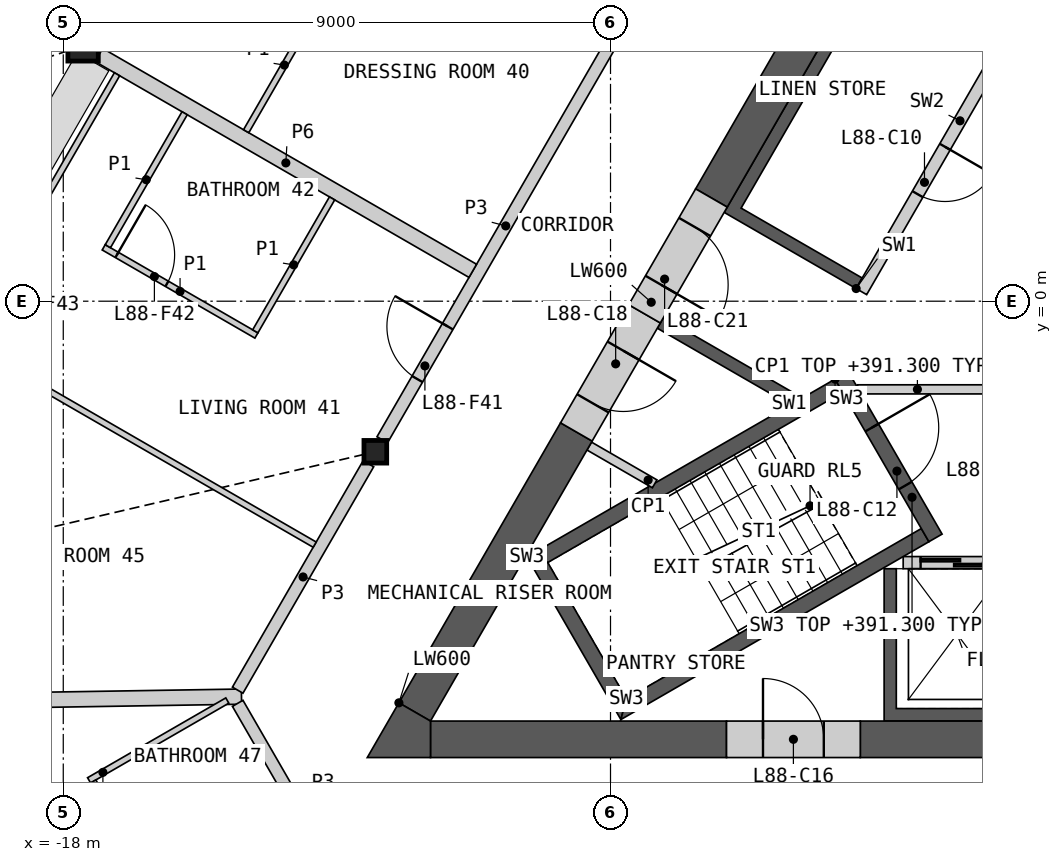
"""IFC4 building model, lengths in metres.
Left out: names, types, materials, properties, quantities, classifications, styles, units other than length and angle.
Written with IfcOpenShell. Run it as: python <this file> out.ifc"""

import sys

from ifc_helpers import new_model, si_unit, direction, frame, frame_2d, origin, origin_2d, place, context, subcontext, project, spatial, polyline, rectangle, hollow_rectangle, i_section, outline, extrude, element, fill, save


model = new_model("IFC4")
c1 = context("Model", 3, precision=1e-05, world=origin(), true_north=direction((0.0, 1.0)))
c2 = subcontext(c1, "Body", "Model", "MODEL_VIEW")
j1 = project(units=[si_unit("LENGTHUNIT", "METRE"), si_unit("PLANEANGLEUNIT", "RADIAN")], contexts=[c1])
p1 = place(None, origin())
s1 = spatial("IfcSite", under=j1, at=p1, CompositionType="ELEMENT")
p2 = place(p1, origin())
s2 = spatial("IfcBuilding", under=s1, at=p2, CompositionType="ELEMENT")
p3 = place(p2, frame((0.0, 0.0, 388.2)))
s3 = spatial("IfcBuildingStorey", under=s2, at=p3, CompositionType="ELEMENT", Elevation=388.2)
p4 = place(p3, frame((-17.674, 4.199, 0.0), z_axis=(0.0, 0.0, 1.0), x_axis=(1.0, 0.0, 0.0)))
e1 = element("IfcColumn", 1, at=p4, inside=s3, PredefinedType="COLUMN", context=c2, shape_type="SweptSolid", body=[
    extrude(hollow_rectangle(XDim=0.5, YDim=0.5, WallThickness=0.03, at=origin_2d()), origin(), (0.0, 0.0, 1.0), 3.4),
])
p5 = place(p3, frame((-12.868, -2.476, 0.0), z_axis=(0.0, 0.0, 1.0), x_axis=(1.0, 0.0, 0.0)))
e2 = element("IfcColumn", 2, at=p5, inside=s3, PredefinedType="COLUMN", context=c2, shape_type="SweptSolid", body=[
    extrude(i_section(OverallWidth=0.374, OverallDepth=0.372, WebThickness=0.016, FlangeThickness=0.026, at=origin_2d()), origin(), (0.0, 0.0, 1.0), 3.4),
])
p6 = place(p3, origin())
e3 = element("IfcWall", 3, at=p6, inside=s3, PredefinedType="SHEAR", context=c2, shape_type="SweptSolid", body=[
    extrude(outline(polyline([(4.5, -4.4), (4.5, -6.906), (-4.5, -6.906), (-4.5, -4.4), (-4.3, -4.4), (-4.3, -6.7), (-2.3, -6.7), (-2.3, -4.4), (-2.1, -4.4), (-2.1, -6.7), (-0.1, -6.7), (-0.1, -4.4), (0.1, -4.4), (0.1, -6.7), (2.1, -6.7), (2.1, -4.4), (2.3, -4.4), (2.3, -6.7), (4.3, -6.7), (4.3, -4.4), (4.5, -4.4)])), origin(), (0.0, 0.0, 1.0), 3.1),
])
p7 = place(p3, frame((-4.187, -4.3, 0.0), z_axis=(0.0, 0.0, 1.0), x_axis=(1.0, 0.0, 0.0)))
e4 = element("IfcWall", 4, at=p7, inside=s3, PredefinedType="SOLIDWALL", context=c2, shape_type="SweptSolid", body=[
    extrude(rectangle(XDim=8.373, YDim=0.2, at=frame_2d((4.187, 0.0))), origin(), (0.0, 0.0, 1.0), 3.1),
])
p8 = place(p7, frame((0.287, 0.0, 0.0)))
e5 = element("IfcOpeningElement", 5, at=p8, cuts=e4, PredefinedType="OPENING", context=c2, shape_type="SweptSolid", body=[
    extrude(rectangle(XDim=1.2, YDim=2.1, at=frame_2d((0.6, 1.05))), frame((0.0, 0.11, 0.0), z_axis=(0.0, -1.0, 0.0), x_axis=(1.0, 0.0, 0.0)), (0.0, 0.0, 1.0), 0.22),
])
p9 = place(p7, frame((2.387, 0.0, 0.0)))
e6 = element("IfcOpeningElement", 6, at=p9, cuts=e4, PredefinedType="OPENING", context=c2, shape_type="SweptSolid", body=[
    extrude(rectangle(XDim=1.4, YDim=2.1, at=frame_2d((0.7, 1.05))), frame((0.0, 0.11, 0.0), z_axis=(0.0, -1.0, 0.0), x_axis=(1.0, 0.0, 0.0)), (0.0, 0.0, 1.0), 0.22),
])
p10 = place(p7, frame((4.737, 0.0, 0.0)))
e7 = element("IfcOpeningElement", 7, at=p10, cuts=e4, PredefinedType="OPENING", context=c2, shape_type="SweptSolid", body=[
    extrude(rectangle(XDim=1.1, YDim=2.1, at=frame_2d((0.55, 1.05))), frame((0.0, 0.11, 0.0), z_axis=(0.0, -1.0, 0.0), x_axis=(1.0, 0.0, 0.0)), (0.0, 0.0, 1.0), 0.22),
])
p11 = place(p7, frame((6.887, 0.0, 0.0)))
e8 = element("IfcOpeningElement", 8, at=p11, cuts=e4, PredefinedType="OPENING", context=c2, shape_type="SweptSolid", body=[
    extrude(rectangle(XDim=1.2, YDim=2.1, at=frame_2d((0.6, 1.05))), frame((0.0, 0.11, 0.0), z_axis=(0.0, -1.0, 0.0), x_axis=(1.0, 0.0, 0.0)), (0.0, 0.0, 1.0), 0.22),
])
p12 = place(p3, origin())
e9 = element("IfcWall", 9, at=p12, inside=s3, PredefinedType="SHEAR", context=c2, shape_type="SweptSolid", body=[
    extrude(outline(polyline([(-6.061, -1.697), (-8.231, -0.444), (-8.131, -0.271), (-5.96, -1.524), (-6.061, -1.697)])), origin(), (0.0, 0.0, 1.0), 3.1),
])
p13 = place(p3, origin())
e10 = element("IfcWall", 10, at=p13, inside=s3, PredefinedType="SHEAR", context=c2, shape_type="SweptSolid", body=[
    extrude(outline(polyline([(-4.96, 0.208), (-7.131, 1.461), (-3.731, 7.35), (-1.561, 6.097), (-1.66, 5.924), (-3.652, 7.074), (-4.652, 5.342), (-2.66, 4.192), (-2.76, 4.019), (-4.752, 5.169), (-6.852, 1.531), (-4.861, 0.381), (-4.96, 0.208)])), origin(), (0.0, 0.0, 1.0), 3.1),
])
p14 = place(p3, frame((-1.631, 5.776, 0.0), z_axis=(0.0, 0.0, 1.0), x_axis=(-0.499992876559, -0.866029516466, 0.0)))
e11 = element("IfcWall", 11, at=p14, inside=s3, PredefinedType="SOLIDWALL", context=c2, shape_type="SweptSolid", body=[
    extrude(rectangle(XDim=6.486, YDim=0.2, at=frame_2d((3.243, 0.0))), origin(), (0.0, 0.0, 1.0), 3.1),
])
p15 = place(p14, frame((0.437, 0.0, 0.0)))
e12 = element("IfcOpeningElement", 12, at=p15, cuts=e11, PredefinedType="OPENING", context=c2, shape_type="SweptSolid", body=[
    extrude(rectangle(XDim=0.9, YDim=2.1, at=frame_2d((0.45, 1.05))), frame((0.0, 0.11, 0.0), z_axis=(0.0, -1.0, 0.0), x_axis=(1.0, 0.0, 0.0)), (0.0, 0.0, 1.0), 0.22),
])
p16 = place(p14, frame((3.737, 0.0, 0.0)))
e13 = element("IfcOpeningElement", 13, at=p16, cuts=e11, PredefinedType="OPENING", context=c2, shape_type="SweptSolid", body=[
    extrude(rectangle(XDim=0.9, YDim=2.1, at=frame_2d((0.45, 1.05))), frame((0.0, 0.11, 0.0), z_axis=(0.0, -1.0, 0.0), x_axis=(1.0, 0.0, 0.0)), (0.0, 0.0, 1.0), 0.22),
])
p17 = place(p3, frame((-4.941, -1.45, 0.0), z_axis=(0.0, 0.0, 1.0), x_axis=(1.0, 0.0, 0.0)))
e14 = element("IfcWall", 14, at=p17, inside=s3, PredefinedType="PARTITIONING", context=c2, shape_type="SweptSolid", body=[
    extrude(rectangle(XDim=9.882, YDim=0.15, at=frame_2d((4.941, 0.0))), origin(), (0.0, 0.0, 1.0), 3.1),
])
p18 = place(p17, frame((4.391, 0.0, 0.0)))
e15 = element("IfcOpeningElement", 15, at=p18, cuts=e14, PredefinedType="OPENING", context=c2, shape_type="SweptSolid", body=[
    extrude(rectangle(XDim=1.1, YDim=2.1, at=frame_2d((0.55, 1.05))), frame((0.0, 0.085, 0.0), z_axis=(0.0, -1.0, 0.0), x_axis=(1.0, 0.0, 0.0)), (0.0, 0.0, 1.0), 0.17),
])
p19 = place(p3, origin())
e16 = element("IfcWall", 16, at=p19, inside=s3, PredefinedType="SHEAR", context=c2, shape_type="SweptSolid", body=[
    extrude(outline(polyline([(-5.307, -1.281), (-10.374, -4.206), (-10.032, -4.298), (-5.182, -1.498), (-5.307, -1.281)])), origin(), (0.0, 0.0, 1.0), 3.1),
])
p20 = place(p3, origin())
e17 = element("IfcWall", 17, at=p20, inside=s3, PredefinedType="SHEAR", context=c2, shape_type="SweptSolid", body=[
    extrude(outline(polyline([(-10.374, -4.206), (-8.83, -6.881), (-8.738, -6.539), (-10.032, -4.298), (-10.374, -4.206)])), origin(), (0.0, 0.0, 1.0), 3.1),
])
p21 = place(p3, origin())
e18 = element("IfcWall", 18, at=p21, inside=s3, PredefinedType="SHEAR", context=c2, shape_type="SweptSolid", body=[
    extrude(outline(polyline([(-8.738, -6.539), (-8.83, -6.881), (-3.763, -3.956), (-3.888, -3.739), (-8.738, -6.539)])), origin(), (0.0, 0.0, 1.0), 3.1),
])
p22 = place(p3, frame((-5.199, -1.219, 0.0), z_axis=(0.0, 0.0, 1.0), x_axis=(0.499982516597, -0.866035497597, 0.0)))
e19 = element("IfcWall", 19, at=p22, inside=s3, PredefinedType="SHEAR", context=c2, shape_type="SweptSolid", body=[
    extrude(rectangle(XDim=3.088, YDim=0.25, at=frame_2d((1.544, 0.0))), origin(), (0.0, 0.0, 1.0), 3.1),
])
p23 = place(p22, frame((0.994, 0.0, 0.0)))
e20 = element("IfcOpeningElement", 20, at=p23, cuts=e19, PredefinedType="OPENING", context=c2, shape_type="SweptSolid", body=[
    extrude(rectangle(XDim=1.1, YDim=2.1, at=frame_2d((0.55, 1.05))), frame((0.0, 0.135, 0.0), z_axis=(0.0, -1.0, 0.0), x_axis=(1.0, 0.0, 0.0)), (0.0, 0.0, 1.0), 0.27),
])
p24 = place(p3, frame((-9.35, -2.383, 0.0), z_axis=(0.0, 0.0, 1.0), x_axis=(0.866057962423, -0.499943602543, 0.0)))
e21 = element("IfcWall", 21, at=p24, inside=s3, PredefinedType="PARTITIONING", context=c2, shape_type="SweptSolid", body=[
    extrude(rectangle(XDim=1.242, YDim=0.15, at=frame_2d((0.621, 0.0))), origin(), (0.0, 0.0, 1.0), 3.1),
])
p25 = place(p3, frame((-4.892, -7.206, 0.0), z_axis=(0.0, 0.0, 1.0), x_axis=(1.0, 0.0, 0.0)))
e22 = element("IfcWall", 22, at=p25, inside=s3, PredefinedType="SHEAR", context=c2, shape_type="SweptSolid", body=[
    extrude(rectangle(XDim=14.261, YDim=0.6, at=frame_2d((7.13, 0.0))), origin(), (0.0, 0.0, 1.0), 3.1),
])
p26 = place(p3, frame((-11.961, -7.206, 0.0), z_axis=(0.0, 0.0, 1.0), x_axis=(1.0, 0.0, 0.0)))
e23 = element("IfcWall", 23, at=p26, inside=s3, PredefinedType="SHEAR", context=c2, shape_type="SweptSolid", body=[
    extrude(rectangle(XDim=4.868, YDim=0.6, at=frame_2d((2.434, 0.0))), origin(), (0.0, 0.0, 1.0), 3.1),
])
p27 = place(p3, frame((-3.639, 8.107, 0.0), z_axis=(0.0, 0.0, 1.0), x_axis=(-0.49999180351, -0.866030135978, 0.0)))
e24 = element("IfcWall", 24, at=p27, inside=s3, PredefinedType="SHEAR", context=c2, shape_type="SweptSolid", body=[
    extrude(rectangle(XDim=7.401, YDim=0.6, at=frame_2d((3.701, 0.0))), origin(), (0.0, 0.0, 1.0), 3.1),
])
p28 = place(p3, frame((-9.562, -2.15, 0.0), z_axis=(0.0, 0.0, 1.0), x_axis=(-0.500015214976, -0.866016619236, 0.0)))
e25 = element("IfcWall", 25, at=p28, inside=s3, PredefinedType="SHEAR", context=c2, shape_type="SweptSolid", body=[
    extrude(rectangle(XDim=5.318, YDim=0.6, at=frame_2d((2.659, 0.0))), origin(), (0.0, 0.0, 1.0), 3.1),
])
p29 = place(p3, origin())
e26 = element("IfcWall", 26, at=p29, inside=s3, PredefinedType="SHEAR", context=c2, shape_type="SweptSolid", body=[
    extrude(outline(polyline([(-12.48, -6.606), (-11.961, -6.906), (-11.961, -7.506), (-13.0, -7.506), (-12.48, -6.606)])), origin(), (0.0, 0.0, 1.0), 3.1),
])
p30 = place(p3, frame((-7.092, -7.206, 0.0), z_axis=(0.0, 0.0, 1.0), x_axis=(1.0, 0.0, 0.0)))
e27 = element("IfcWall", 27, at=p30, inside=s3, PredefinedType="SHEAR", context=c2, shape_type="SweptSolid", body=[
    extrude(rectangle(XDim=2.2, YDim=0.6, at=frame_2d((1.1, 0.0))), origin(), (0.0, 0.0, 1.0), 3.1),
])
p31 = place(p30, frame((0.6, 0.0, 0.0)))
e28 = element("IfcOpeningElement", 28, at=p31, cuts=e27, PredefinedType="OPENING", context=c2, shape_type="SweptSolid", body=[
    extrude(rectangle(XDim=1.0, YDim=2.1, at=frame_2d((0.5, 1.05))), frame((0.0, 0.31, 0.0), z_axis=(0.0, -1.0, 0.0), x_axis=(1.0, 0.0, 0.0)), (0.0, 0.0, 1.0), 0.62),
])
p32 = place(p3, frame((-8.44, -0.208, 0.0), z_axis=(0.0, 0.0, 1.0), x_axis=(-0.500001951578, -0.866024277037, 0.0)))
e29 = element("IfcWall", 29, at=p32, inside=s3, PredefinedType="SHEAR", context=c2, shape_type="SweptSolid", body=[
    extrude(rectangle(XDim=2.243, YDim=0.6, at=frame_2d((1.122, 0.0))), origin(), (0.0, 0.0, 1.0), 3.1),
])
p33 = place(p32, frame((0.7, 0.0, 0.0)))
e30 = element("IfcOpeningElement", 30, at=p33, cuts=e29, PredefinedType="OPENING", context=c2, shape_type="SweptSolid", body=[
    extrude(rectangle(XDim=1.0, YDim=2.1, at=frame_2d((0.5, 1.05))), frame((0.0, 0.31, 0.0), z_axis=(0.0, -1.0, 0.0), x_axis=(1.0, 0.0, 0.0)), (0.0, 0.0, 1.0), 0.62),
])
p34 = place(p3, frame((-7.34, 1.698, 0.0), z_axis=(0.0, 0.0, 1.0), x_axis=(-0.50002983664, -0.866008176907, 0.0)))
e31 = element("IfcWall", 31, at=p34, inside=s3, PredefinedType="SHEAR", context=c2, shape_type="SweptSolid", body=[
    extrude(rectangle(XDim=2.2, YDim=0.6, at=frame_2d((1.1, 0.0))), origin(), (0.0, 0.0, 1.0), 3.1),
])
p35 = place(p34, frame((0.55, 0.0, 0.0)))
e32 = element("IfcOpeningElement", 32, at=p35, cuts=e31, PredefinedType="OPENING", context=c2, shape_type="SweptSolid", body=[
    extrude(rectangle(XDim=1.1, YDim=2.1, at=frame_2d((0.55, 1.05))), frame((0.0, 0.31, 0.0), z_axis=(0.0, -1.0, 0.0), x_axis=(1.0, 0.0, 0.0)), (0.0, 0.0, 1.0), 0.62),
])
p36 = place(p3, frame((-29.269, -6.732, 0.0), z_axis=(0.0, 0.0, 1.0), x_axis=(0.999870533117, 0.016090898164, 0.0)))
e33 = element("IfcWall", 33, at=p36, inside=s3, PredefinedType="PARTITIONING", context=c2, shape_type="SweptSolid", body=[
    extrude(rectangle(XDim=14.202, YDim=0.25, at=frame_2d((7.101, 0.0))), origin(), (0.0, 0.0, 1.0), 2.33),
])
p37 = place(p3, frame((-12.754, -2.279, 0.0), z_axis=(0.0, 0.0, 1.0), x_axis=(0.500001682468, 0.866024432409, 0.0)))
e34 = element("IfcWall", 34, at=p37, inside=s3, PredefinedType="PARTITIONING", context=c2, shape_type="SweptSolid", body=[
    extrude(rectangle(XDim=8.124, YDim=0.2, at=frame_2d((4.062, 0.0))), origin(), (0.0, 0.0, 1.0), 3.1),
])
p38 = place(p37, frame((1.153, 0.0, 0.0)))
e35 = element("IfcOpeningElement", 35, at=p38, cuts=e34, PredefinedType="OPENING", context=c2, shape_type="SweptSolid", body=[
    extrude(rectangle(XDim=1.0, YDim=2.1, at=frame_2d((0.5, 1.05))), frame((0.0, 0.11, 0.0), z_axis=(0.0, -1.0, 0.0), x_axis=(1.0, 0.0, 0.0)), (0.0, 0.0, 1.0), 0.22),
])
p39 = place(p3, frame((-17.414, 4.049, 0.0), z_axis=(0.0, 0.0, 1.0), x_axis=(0.866033839264, -0.499985389037, 0.0)))
e36 = element("IfcWall", 36, at=p39, inside=s3, PredefinedType="PARTITIONING", context=c2, shape_type="SweptSolid", body=[
    extrude(rectangle(XDim=7.1, YDim=0.25, at=frame_2d((3.55, 0.0))), origin(), (0.0, 0.0, 1.0), 2.33),
])
p40 = place(p3, frame((-15.131, -6.397, 0.0), z_axis=(0.0, 0.0, 1.0), x_axis=(0.499986217557, 0.866033360935, 0.0)))
e37 = element("IfcWall", 37, at=p40, inside=s3, PredefinedType="PARTITIONING", context=c2, shape_type="SweptSolid", body=[
    extrude(rectangle(XDim=4.3, YDim=0.2, at=frame_2d((2.15, 0.0))), origin(), (0.0, 0.0, 1.0), 3.1),
])
p41 = place(p3, frame((-15.131, -6.614, 0.0), z_axis=(0.0, 0.0, 1.0), x_axis=(0.499967746641, -0.866044024469, 0.0)))
e38 = element("IfcWall", 38, at=p41, inside=s3, PredefinedType="PARTITIONING", context=c2, shape_type="SweptSolid", body=[
    extrude(rectangle(XDim=3.676, YDim=0.2, at=frame_2d((1.838, 0.0))), origin(), (0.0, 0.0, 1.0), 3.1),
])
p42 = place(p41, frame((2.426, 0.0, 0.0)))
e39 = element("IfcOpeningElement", 39, at=p42, cuts=e38, PredefinedType="OPENING", context=c2, shape_type="SweptSolid", body=[
    extrude(rectangle(XDim=1.0, YDim=2.1, at=frame_2d((0.5, 1.05))), frame((0.0, 0.11, 0.0), z_axis=(0.0, -1.0, 0.0), x_axis=(1.0, 0.0, 0.0)), (0.0, 0.0, 1.0), 0.22),
])
p43 = place(p3, frame((-24.069, 1.887, 0.0), z_axis=(0.0, 0.0, 1.0), x_axis=(0.866023404247, -0.500003463284, 0.0)))
e40 = element("IfcWall", 40, at=p43, inside=s3, PredefinedType="PARTITIONING", context=c2, shape_type="SweptSolid", body=[
    extrude(rectangle(XDim=11.782, YDim=0.1, at=frame_2d((5.891, 0.0))), origin(), (0.0, 0.0, 1.0), 2.33),
])
p44 = place(p43, frame((3.159, 0.0, 0.0)))
e41 = element("IfcOpeningElement", 41, at=p44, cuts=e40, PredefinedType="OPENING", context=c2, shape_type="SweptSolid", body=[
    extrude(rectangle(XDim=0.95, YDim=2.1, at=frame_2d((0.475, 1.05))), frame((0.0, 0.06, 0.0), z_axis=(0.0, -1.0, 0.0), x_axis=(1.0, 0.0, 0.0)), (0.0, 0.0, 1.0), 0.12),
])
p45 = place(p3, frame((-19.628, -0.619, 0.0), z_axis=(0.0, 0.0, 1.0), x_axis=(0.499990214365, 0.86603105345, 0.0)))
e42 = element("IfcWall", 42, at=p45, inside=s3, PredefinedType="PARTITIONING", context=c2, shape_type="SweptSolid", body=[
    extrude(rectangle(XDim=5.025, YDim=0.1, at=frame_2d((2.512, 0.0))), origin(), (0.0, 0.0, 1.0), 2.33),
])
p46 = place(p45, frame((1.067, 0.0, 0.0)))
e43 = element("IfcOpeningElement", 43, at=p46, cuts=e42, PredefinedType="OPENING", context=c2, shape_type="SweptSolid", body=[
    extrude(rectangle(XDim=0.95, YDim=2.1, at=frame_2d((0.475, 1.05))), frame((0.0, 0.06, 0.0), z_axis=(0.0, -1.0, 0.0), x_axis=(1.0, 0.0, 0.0)), (0.0, 0.0, 1.0), 0.12),
])
p47 = place(p3, frame((-14.992, 2.796, 0.0), z_axis=(0.0, 0.0, 1.0), x_axis=(0.499990214365, 0.86603105345, 0.0)))
e44 = element("IfcWall", 44, at=p47, inside=s3, PredefinedType="PARTITIONING", context=c2, shape_type="SweptSolid", body=[
    extrude(rectangle(XDim=5.025, YDim=0.1, at=frame_2d((2.512, 0.0))), origin(), (0.0, 0.0, 1.0), 2.33),
])
p48 = place(p47, frame((1.68, 0.0, 0.0)))
e45 = element("IfcOpeningElement", 45, at=p48, cuts=e44, PredefinedType="OPENING", context=c2, shape_type="SweptSolid", body=[
    extrude(rectangle(XDim=0.95, YDim=2.1, at=frame_2d((0.475, 1.05))), frame((0.0, 0.06, 0.0), z_axis=(0.0, -1.0, 0.0), x_axis=(1.0, 0.0, 0.0)), (0.0, 0.0, 1.0), 0.12),
])
p49 = place(p3, frame((-17.335, 0.886, 0.0), z_axis=(0.0, 0.0, 1.0), x_axis=(0.866032775405, -0.499987231761, 0.0)))
e46 = element("IfcWall", 46, at=p49, inside=s3, PredefinedType="PARTITIONING", context=c2, shape_type="SweptSolid", body=[
    extrude(rectangle(XDim=2.9, YDim=0.1, at=frame_2d((1.45, 0.0))), origin(), (0.0, 0.0, 1.0), 2.33),
])
p50 = place(p49, frame((0.25, 0.0, 0.0)))
e47 = element("IfcOpeningElement", 47, at=p50, cuts=e46, PredefinedType="OPENING", context=c2, shape_type="SweptSolid", body=[
    extrude(rectangle(XDim=0.95, YDim=2.1, at=frame_2d((0.475, 1.05))), frame((0.0, 0.06, 0.0), z_axis=(0.0, -1.0, 0.0), x_axis=(1.0, 0.0, 0.0)), (0.0, 0.0, 1.0), 0.12),
])
p51 = place(p3, frame((-17.575, -7.881, 0.0), z_axis=(0.0, 0.0, 1.0), x_axis=(0.866036909293, 0.499980071345, 0.0)))
e48 = element("IfcWall", 48, at=p51, inside=s3, PredefinedType="PARTITIONING", context=c2, shape_type="SweptSolid", body=[
    extrude(rectangle(XDim=2.625, YDim=0.1, at=frame_2d((1.312, 0.0))), origin(), (0.0, 0.0, 1.0), 2.33),
])
p52 = place(p3, frame((-17.267, 0.905, 0.0), z_axis=(0.0, 0.0, 1.0), x_axis=(0.499976333282, 0.866039067339, 0.0)))
e49 = element("IfcWall", 49, at=p52, inside=s3, PredefinedType="PARTITIONING", context=c2, shape_type="SweptSolid", body=[
    extrude(rectangle(XDim=2.525, YDim=0.1, at=frame_2d((1.262, 0.0))), origin(), (0.0, 0.0, 1.0), 2.33),
])
p53 = place(p3, frame((-14.842, -0.496, 0.0), z_axis=(0.0, 0.0, 1.0), x_axis=(0.500048846702, 0.865997200291, 0.0)))
e50 = element("IfcWall", 50, at=p53, inside=s3, PredefinedType="PARTITIONING", context=c2, shape_type="SweptSolid", body=[
    extrude(rectangle(XDim=2.525, YDim=0.1, at=frame_2d((1.263, 0.0))), origin(), (0.0, 0.0, 1.0), 2.33),
])
p54 = place(p3, frame((-17.507, -7.899, 0.0), z_axis=(0.0, 0.0, 1.0), x_axis=(0.500011643316, -0.866018681408, 0.0)))
e51 = element("IfcWall", 51, at=p54, inside=s3, PredefinedType="PARTITIONING", context=c2, shape_type="SweptSolid", body=[
    extrude(rectangle(XDim=1.973, YDim=0.1, at=frame_2d((0.987, 0.0))), origin(), (0.0, 0.0, 1.0), 2.33),
])
p55 = place(p8, origin())
e52 = element("IfcDoor", 52, at=p55, inside=s3, OperationType="SLIDING_TO_LEFT", PredefinedType="DOOR", context=c2, shape_type="SweptSolid", body=[
    extrude(rectangle(XDim=1.2, YDim=2.1, at=frame_2d((0.6, 1.05))), frame((0.0, 0.025, 0.0), z_axis=(0.0, -1.0, 0.0), x_axis=(1.0, 0.0, 0.0)), (0.0, 0.0, 1.0), 0.05),
])
fill(e5, e52)
p56 = place(p16, origin())
e53 = element("IfcDoor", 53, at=p56, inside=s3, OperationType="SINGLE_SWING_LEFT", PredefinedType="DOOR", context=c2, shape_type="SweptSolid", body=[
    extrude(rectangle(XDim=0.9, YDim=2.1, at=frame_2d((0.45, 1.05))), frame((0.0, 0.025, 0.0), z_axis=(0.0, -1.0, 0.0), x_axis=(1.0, 0.0, 0.0)), (0.0, 0.0, 1.0), 0.05),
])
fill(e13, e53)
p57 = place(p23, origin())
e54 = element("IfcDoor", 54, at=p57, inside=s3, OperationType="SINGLE_SWING_LEFT", PredefinedType="DOOR", context=c2, shape_type="SweptSolid", body=[
    extrude(rectangle(XDim=1.1, YDim=2.1, at=frame_2d((0.55, 1.05))), frame((0.0, 0.025, 0.0), z_axis=(0.0, -1.0, 0.0), x_axis=(1.0, 0.0, 0.0)), (0.0, 0.0, 1.0), 0.05),
])
fill(e20, e54)
p58 = place(p31, origin())
e55 = element("IfcDoor", 55, at=p58, inside=s3, OperationType="SINGLE_SWING_LEFT", PredefinedType="DOOR", context=c2, shape_type="SweptSolid", body=[
    extrude(rectangle(XDim=1.0, YDim=2.1, at=frame_2d((0.5, 1.05))), frame((0.0, 0.055, 0.0), z_axis=(0.0, -1.0, 0.0), x_axis=(1.0, 0.0, 0.0)), (0.0, 0.0, 1.0), 0.05),
])
fill(e28, e55)
p59 = place(p33, origin())
e56 = element("IfcDoor", 56, at=p59, inside=s3, OperationType="SINGLE_SWING_LEFT", PredefinedType="DOOR", context=c2, shape_type="SweptSolid", body=[
    extrude(rectangle(XDim=1.0, YDim=2.1, at=frame_2d((0.5, 1.05))), frame((0.0, 0.055, 0.0), z_axis=(0.0, -1.0, 0.0), x_axis=(1.0, 0.0, 0.0)), (0.0, 0.0, 1.0), 0.05),
])
fill(e30, e56)
p60 = place(p35, origin())
e57 = element("IfcDoor", 57, at=p60, inside=s3, OperationType="SINGLE_SWING_RIGHT", PredefinedType="DOOR", context=c2, shape_type="SweptSolid", body=[
    extrude(rectangle(XDim=1.1, YDim=2.1, at=frame_2d((0.55, 1.05))), frame((0.0, 0.055, 0.0), z_axis=(0.0, -1.0, 0.0), x_axis=(1.0, 0.0, 0.0)), (0.0, 0.0, 1.0), 0.05),
])
fill(e32, e57)
p61 = place(p38, origin())
e58 = element("IfcDoor", 58, at=p61, inside=s3, OperationType="SINGLE_SWING_RIGHT", PredefinedType="DOOR", context=c2, shape_type="SweptSolid", body=[
    extrude(rectangle(XDim=1.0, YDim=2.1, at=frame_2d((0.5, 1.05))), frame((0.0, 0.025, 0.0), z_axis=(0.0, -1.0, 0.0), x_axis=(1.0, 0.0, 0.0)), (0.0, 0.0, 1.0), 0.05),
])
fill(e35, e58)
p62 = place(p50, origin())
e59 = element("IfcDoor", 59, at=p62, inside=s3, OperationType="SINGLE_SWING_LEFT", PredefinedType="DOOR", context=c2, shape_type="SweptSolid", body=[
    extrude(rectangle(XDim=0.95, YDim=2.1, at=frame_2d((0.475, 1.05))), frame((0.0, 0.025, 0.0), z_axis=(0.0, -1.0, 0.0), x_axis=(1.0, 0.0, 0.0)), (0.0, 0.0, 1.0), 0.05),
])
fill(e47, e59)
save(model, sys.argv[1])
